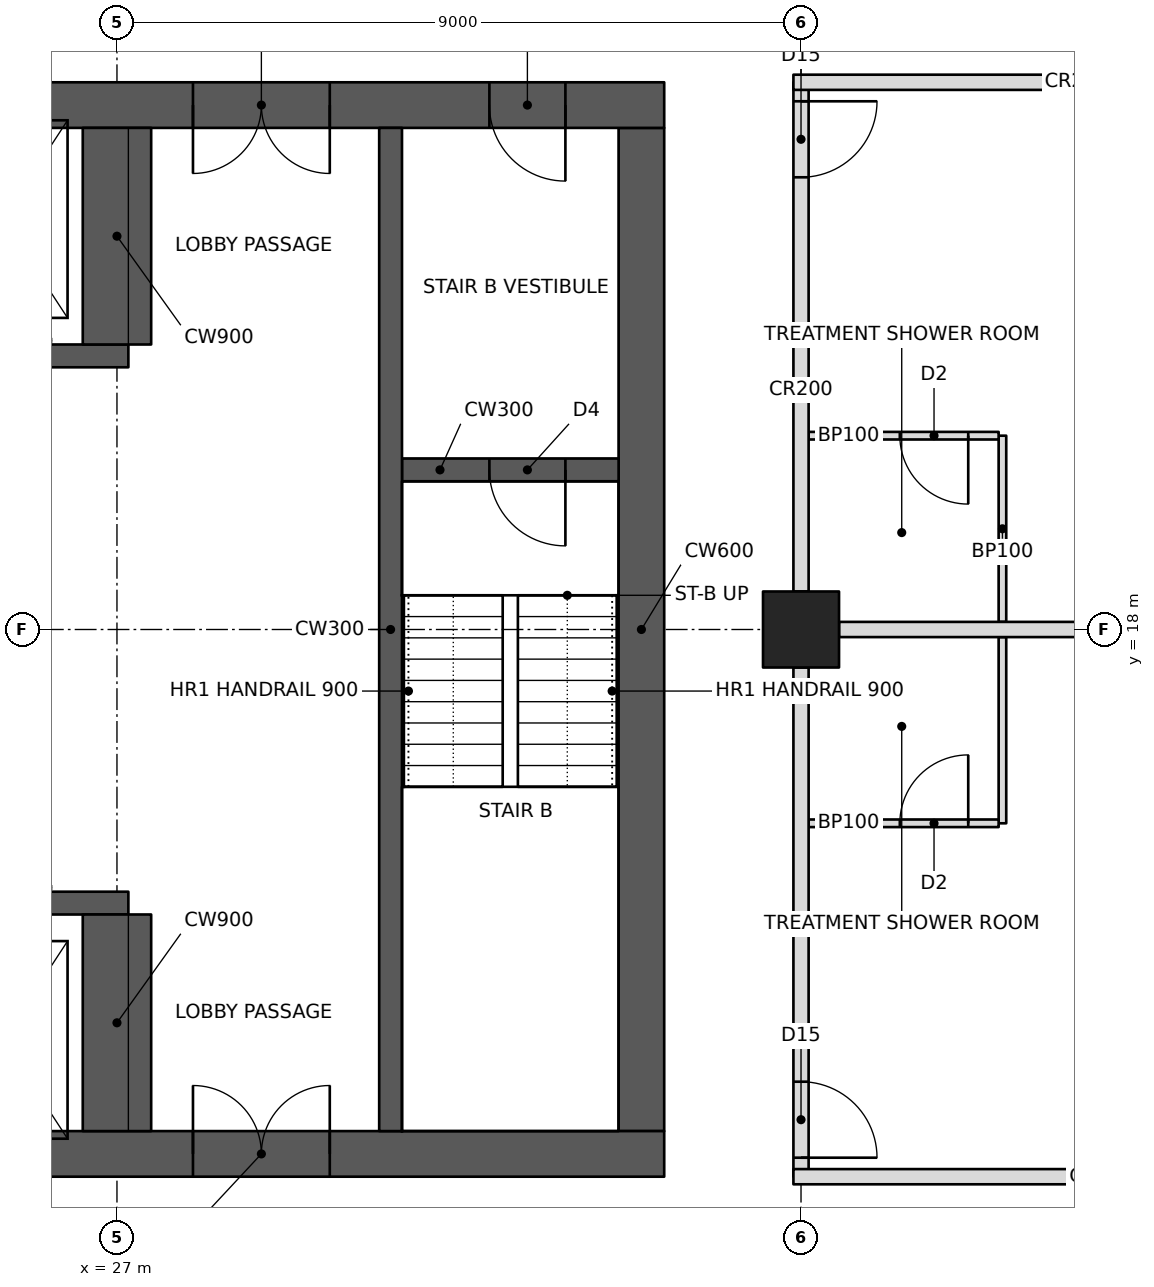
"""IFC4 building model, lengths in metres.
Left out: names, types, materials, properties, quantities, classifications, styles, units other than length and angle.
Written with IfcOpenShell. Run it as: python <this file> out.ifc"""

import sys

from ifc_helpers import new_model, si_unit, direction, frame, frame_2d, origin, origin_2d, place, context, subcontext, project, spatial, rectangle, hollow_rectangle, extrude, element, fill, save


model = new_model("IFC4")
c1 = context("Model", 3, precision=1e-05, world=origin(), true_north=direction((0.0, 1.0)))
c2 = subcontext(c1, "Body", "Model", "MODEL_VIEW")
j1 = project(units=[si_unit("LENGTHUNIT", "METRE"), si_unit("PLANEANGLEUNIT", "RADIAN")], contexts=[c1])
p1 = place(None, origin())
s1 = spatial("IfcSite", under=j1, at=p1, CompositionType="ELEMENT")
p2 = place(p1, origin())
s2 = spatial("IfcBuilding", under=s1, at=p2, CompositionType="ELEMENT")
p3 = place(p2, frame((0.0, 0.0, 160.4)))
s3 = spatial("IfcBuildingStorey", under=s2, at=p3, CompositionType="ELEMENT", Elevation=160.4)
p4 = place(p3, frame((36.0, 18.0, 0.0), z_axis=(0.0, 0.0, 1.0), x_axis=(0.0, 1.0, 0.0)))
e1 = element("IfcColumn", 1, at=p4, inside=s3, PredefinedType="COLUMN", context=c2, shape_type="SweptSolid", body=[
    extrude(hollow_rectangle(XDim=1.0, YDim=1.0, WallThickness=0.1, at=origin_2d()), origin(), (0.0, 0.0, 1.0), 3.4),
])
p5 = place(p3, frame((10.8, 11.1, 0.0), z_axis=(0.0, 0.0, 1.0), x_axis=(1.0, 0.0, 0.0)))
e2 = element("IfcWall", 2, at=p5, inside=s3, PredefinedType="SHEAR", context=c2, shape_type="SweptSolid", body=[
    extrude(rectangle(XDim=23.4, YDim=0.6, at=frame_2d((11.7, 0.0))), origin(), (0.0, 0.0, 1.0), 3.4),
])
p6 = place(p5, frame((1.0, 0.0, 0.0)))
e3 = element("IfcOpeningElement", 3, at=p6, cuts=e2, PredefinedType="OPENING", context=c2, shape_type="SweptSolid", body=[
    extrude(rectangle(XDim=1.0, YDim=2.1, at=frame_2d((0.5, 1.05))), frame((0.0, 0.31, 0.0), z_axis=(0.0, -1.0, 0.0), x_axis=(1.0, 0.0, 0.0)), (0.0, 0.0, 1.0), 0.62),
])
p7 = place(p5, frame((17.2, 0.0, 0.0)))
e4 = element("IfcOpeningElement", 4, at=p7, cuts=e2, PredefinedType="OPENING", context=c2, shape_type="SweptSolid", body=[
    extrude(rectangle(XDim=1.8, YDim=2.1, at=frame_2d((0.9, 1.05))), frame((0.0, 0.31, 0.0), z_axis=(0.0, -1.0, 0.0), x_axis=(1.0, 0.0, 0.0)), (0.0, 0.0, 1.0), 0.62),
])
p8 = place(p3, frame((10.8, 24.9, 0.0), z_axis=(0.0, 0.0, 1.0), x_axis=(1.0, 0.0, 0.0)))
e5 = element("IfcWall", 5, at=p8, inside=s3, PredefinedType="SHEAR", context=c2, shape_type="SweptSolid", body=[
    extrude(rectangle(XDim=23.4, YDim=0.6, at=frame_2d((11.7, 0.0))), origin(), (0.0, 0.0, 1.0), 3.4),
])
p9 = place(p8, frame((17.2, 0.0, 0.0)))
e6 = element("IfcOpeningElement", 6, at=p9, cuts=e5, PredefinedType="OPENING", context=c2, shape_type="SweptSolid", body=[
    extrude(rectangle(XDim=1.8, YDim=2.1, at=frame_2d((0.9, 1.05))), frame((0.0, 0.31, 0.0), z_axis=(0.0, -1.0, 0.0), x_axis=(1.0, 0.0, 0.0)), (0.0, 0.0, 1.0), 0.62),
])
p10 = place(p8, frame((21.1, 0.0, 0.0)))
e7 = element("IfcOpeningElement", 7, at=p10, cuts=e5, PredefinedType="OPENING", context=c2, shape_type="SweptSolid", body=[
    extrude(rectangle(XDim=1.0, YDim=2.1, at=frame_2d((0.5, 1.05))), frame((0.0, 0.31, 0.0), z_axis=(0.0, -1.0, 0.0), x_axis=(1.0, 0.0, 0.0)), (0.0, 0.0, 1.0), 0.62),
])
p11 = place(p8, frame((4.9, 0.0, 0.0)))
e8 = element("IfcOpeningElement", 8, at=p11, cuts=e5, PredefinedType="OPENING", context=c2, shape_type="SweptSolid", body=[
    extrude(rectangle(XDim=1.0, YDim=2.1, at=frame_2d((0.5, 1.05))), frame((0.0, 0.31, 0.0), z_axis=(0.0, -1.0, 0.0), x_axis=(1.0, 0.0, 0.0)), (0.0, 0.0, 1.0), 0.62),
])
p12 = place(p3, frame((33.9, 11.4, 0.0), z_axis=(0.0, 0.0, 1.0), x_axis=(0.0, 1.0, 0.0)))
e9 = element("IfcWall", 9, at=p12, inside=s3, PredefinedType="SHEAR", context=c2, shape_type="SweptSolid", body=[
    extrude(rectangle(XDim=13.2, YDim=0.6, at=frame_2d((6.6, 0.0))), origin(), (0.0, 0.0, 1.0), 3.4),
])
p13 = place(p3, frame((18.15, 14.4, 0.0), z_axis=(0.0, 0.0, 1.0), x_axis=(1.0, 0.0, 0.0)))
e10 = element("IfcWall", 10, at=p13, inside=s3, PredefinedType="SHEAR", context=c2, shape_type="SweptSolid", body=[
    extrude(rectangle(XDim=9.0, YDim=0.3, at=frame_2d((4.5, 0.0))), origin(), (0.0, 0.0, 1.0), 3.4),
])
p14 = place(p13, frame((0.8, 0.0, 0.0)))
e11 = element("IfcOpeningElement", 11, at=p14, cuts=e10, PredefinedType="OPENING", context=c2, shape_type="SweptSolid", body=[
    extrude(rectangle(XDim=1.1, YDim=2.1, at=frame_2d((0.55, 1.05))), frame((0.0, 0.16, 0.0), z_axis=(0.0, -1.0, 0.0), x_axis=(1.0, 0.0, 0.0)), (0.0, 0.0, 1.0), 0.32),
])
p15 = place(p13, frame((6.75, 0.0, 0.0)))
e12 = element("IfcOpeningElement", 12, at=p15, cuts=e10, PredefinedType="OPENING", context=c2, shape_type="SweptSolid", body=[
    extrude(rectangle(XDim=1.2, YDim=2.1, at=frame_2d((0.6, 1.05))), frame((0.0, 0.16, 0.0), z_axis=(0.0, -1.0, 0.0), x_axis=(1.0, 0.0, 0.0)), (0.0, 0.0, 1.0), 0.32),
])
p16 = place(p13, frame((3.8, 0.0, 0.0)))
e13 = element("IfcOpeningElement", 13, at=p16, cuts=e10, PredefinedType="OPENING", context=c2, shape_type="SweptSolid", body=[
    extrude(rectangle(XDim=1.1, YDim=2.1, at=frame_2d((0.55, 1.05))), frame((0.0, 0.16, 0.0), z_axis=(0.0, -1.0, 0.0), x_axis=(1.0, 0.0, 0.0)), (0.0, 0.0, 1.0), 0.32),
])
p17 = place(p3, frame((27.0, 11.4, 0.0), z_axis=(0.0, 0.0, 1.0), x_axis=(0.0, 1.0, 0.0)))
e14 = element("IfcWall", 14, at=p17, inside=s3, PredefinedType="SHEAR", context=c2, shape_type="SweptSolid", body=[
    extrude(rectangle(XDim=2.85, YDim=0.9, at=frame_2d((1.425, 0.0))), origin(), (0.0, 0.0, 1.0), 3.4),
])
p18 = place(p3, frame((18.15, 21.6, 0.0), z_axis=(0.0, 0.0, 1.0), x_axis=(1.0, 0.0, 0.0)))
e15 = element("IfcWall", 15, at=p18, inside=s3, PredefinedType="SHEAR", context=c2, shape_type="SweptSolid", body=[
    extrude(rectangle(XDim=9.0, YDim=0.3, at=frame_2d((4.5, 0.0))), origin(), (0.0, 0.0, 1.0), 3.4),
])
p19 = place(p18, frame((0.8, 0.0, 0.0)))
e16 = element("IfcOpeningElement", 16, at=p19, cuts=e15, PredefinedType="OPENING", context=c2, shape_type="SweptSolid", body=[
    extrude(rectangle(XDim=1.1, YDim=2.1, at=frame_2d((0.55, 1.05))), frame((0.0, 0.16, 0.0), z_axis=(0.0, -1.0, 0.0), x_axis=(1.0, 0.0, 0.0)), (0.0, 0.0, 1.0), 0.32),
])
p20 = place(p18, frame((3.8, 0.0, 0.0)))
e17 = element("IfcOpeningElement", 17, at=p20, cuts=e15, PredefinedType="OPENING", context=c2, shape_type="SweptSolid", body=[
    extrude(rectangle(XDim=1.1, YDim=2.1, at=frame_2d((0.55, 1.05))), frame((0.0, 0.16, 0.0), z_axis=(0.0, -1.0, 0.0), x_axis=(1.0, 0.0, 0.0)), (0.0, 0.0, 1.0), 0.32),
])
p21 = place(p18, frame((6.75, 0.0, 0.0)))
e18 = element("IfcOpeningElement", 18, at=p21, cuts=e15, PredefinedType="OPENING", context=c2, shape_type="SweptSolid", body=[
    extrude(rectangle(XDim=1.2, YDim=2.1, at=frame_2d((0.6, 1.05))), frame((0.0, 0.16, 0.0), z_axis=(0.0, -1.0, 0.0), x_axis=(1.0, 0.0, 0.0)), (0.0, 0.0, 1.0), 0.32),
])
p22 = place(p3, frame((27.0, 21.75, 0.0), z_axis=(0.0, 0.0, 1.0), x_axis=(0.0, 1.0, 0.0)))
e19 = element("IfcWall", 19, at=p22, inside=s3, PredefinedType="SHEAR", context=c2, shape_type="SweptSolid", body=[
    extrude(rectangle(XDim=2.85, YDim=0.9, at=frame_2d((1.425, 0.0))), origin(), (0.0, 0.0, 1.0), 3.4),
])
p23 = place(p3, frame((30.6, 11.4, 0.0), z_axis=(0.0, 0.0, 1.0), x_axis=(0.0, 1.0, 0.0)))
e20 = element("IfcWall", 20, at=p23, inside=s3, PredefinedType="SHEAR", context=c2, shape_type="SweptSolid", body=[
    extrude(rectangle(XDim=13.2, YDim=0.3, at=frame_2d((6.6, 0.0))), origin(), (0.0, 0.0, 1.0), 3.4),
])
p24 = place(p3, frame((30.75, 20.1, 0.0), z_axis=(0.0, 0.0, 1.0), x_axis=(1.0, 0.0, 0.0)))
e21 = element("IfcWall", 21, at=p24, inside=s3, PredefinedType="SHEAR", context=c2, shape_type="SweptSolid", body=[
    extrude(rectangle(XDim=2.85, YDim=0.3, at=frame_2d((1.425, 0.0))), origin(), (0.0, 0.0, 1.0), 3.4),
])
p25 = place(p24, frame((1.15, 0.0, 0.0)))
e22 = element("IfcOpeningElement", 22, at=p25, cuts=e21, PredefinedType="OPENING", context=c2, shape_type="SweptSolid", body=[
    extrude(rectangle(XDim=1.0, YDim=2.1, at=frame_2d((0.5, 1.05))), frame((0.0, 0.16, 0.0), z_axis=(0.0, -1.0, 0.0), x_axis=(1.0, 0.0, 0.0)), (0.0, 0.0, 1.0), 0.32),
])
p26 = place(p3, frame((36.0, 10.8, 0.0), z_axis=(0.0, 0.0, 1.0), x_axis=(0.0, 1.0, 0.0)))
e23 = element("IfcWall", 23, at=p26, inside=s3, PredefinedType="PARTITIONING", context=c2, shape_type="SweptSolid", body=[
    extrude(rectangle(XDim=6.7, YDim=0.2, at=frame_2d((3.35, 0.0))), origin(), (0.0, 0.0, 1.0), 2.405),
])
p27 = place(p26, frame((0.25, 0.0, 0.0)))
e24 = element("IfcOpeningElement", 24, at=p27, cuts=e23, PredefinedType="OPENING", context=c2, shape_type="SweptSolid", body=[
    extrude(rectangle(XDim=1.0, YDim=2.1, at=frame_2d((0.5, 1.05))), frame((0.0, 0.11, 0.0), z_axis=(0.0, -1.0, 0.0), x_axis=(1.0, 0.0, 0.0)), (0.0, 0.0, 1.0), 0.22),
])
p28 = place(p3, frame((36.0, 18.5, 0.0), z_axis=(0.0, 0.0, 1.0), x_axis=(0.0, 1.0, 0.0)))
e25 = element("IfcWall", 25, at=p28, inside=s3, PredefinedType="PARTITIONING", context=c2, shape_type="SweptSolid", body=[
    extrude(rectangle(XDim=6.7, YDim=0.2, at=frame_2d((3.35, 0.0))), origin(), (0.0, 0.0, 1.0), 2.405),
])
p29 = place(p28, frame((5.45, 0.0, 0.0)))
e26 = element("IfcOpeningElement", 26, at=p29, cuts=e25, PredefinedType="OPENING", context=c2, shape_type="SweptSolid", body=[
    extrude(rectangle(XDim=1.0, YDim=2.1, at=frame_2d((0.5, 1.05))), frame((0.0, 0.11, 0.0), z_axis=(0.0, -1.0, 0.0), x_axis=(1.0, 0.0, 0.0)), (0.0, 0.0, 1.0), 0.22),
])
p30 = place(p3, frame((35.9, 10.8, 0.0), z_axis=(0.0, 0.0, 1.0), x_axis=(1.0, 0.0, 0.0)))
e27 = element("IfcWall", 27, at=p30, inside=s3, PredefinedType="PARTITIONING", context=c2, shape_type="SweptSolid", body=[
    extrude(rectangle(XDim=8.1, YDim=0.2, at=frame_2d((4.05, 0.0))), origin(), (0.0, 0.0, 1.0), 2.404),
])
p31 = place(p3, frame((35.9, 25.2, 0.0), z_axis=(0.0, 0.0, 1.0), x_axis=(1.0, 0.0, 0.0)))
e28 = element("IfcWall", 28, at=p31, inside=s3, PredefinedType="PARTITIONING", context=c2, shape_type="SweptSolid", body=[
    extrude(rectangle(XDim=7.45, YDim=0.2, at=frame_2d((3.725, 0.0))), origin(), (0.0, 0.0, 1.0), 2.404),
])
p32 = place(p3, frame((36.5, 18.0, 0.0), z_axis=(0.0, 0.0, 1.0), x_axis=(1.0, 0.0, 0.0)))
e29 = element("IfcWall", 29, at=p32, inside=s3, PredefinedType="PARTITIONING", context=c2, shape_type="SweptSolid", body=[
    extrude(rectangle(XDim=7.5, YDim=0.2, at=frame_2d((3.75, 0.0))), origin(), (0.0, 0.0, 1.0), 2.405),
])
p33 = place(p3, frame((38.65, 15.45, 0.0), z_axis=(0.0, 0.0, 1.0), x_axis=(0.0, 1.0, 0.0)))
e30 = element("IfcWall", 30, at=p33, inside=s3, PredefinedType="PARTITIONING", context=c2, shape_type="SweptSolid", body=[
    extrude(rectangle(XDim=2.45, YDim=0.1, at=frame_2d((1.225, 0.0))), origin(), (0.0, 0.0, 1.0), 2.404),
])
p34 = place(p3, frame((36.1, 15.45, 0.0), z_axis=(0.0, 0.0, 1.0), x_axis=(1.0, 0.0, 0.0)))
e31 = element("IfcWall", 31, at=p34, inside=s3, PredefinedType="PARTITIONING", context=c2, shape_type="SweptSolid", body=[
    extrude(rectangle(XDim=2.5, YDim=0.1, at=frame_2d((1.25, 0.0))), origin(), (0.0, 0.0, 1.0), 2.404),
])
p35 = place(p34, frame((1.2, 0.0, 0.0)))
e32 = element("IfcOpeningElement", 32, at=p35, cuts=e31, PredefinedType="OPENING", context=c2, shape_type="SweptSolid", body=[
    extrude(rectangle(XDim=0.9, YDim=2.1, at=frame_2d((0.45, 1.05))), frame((0.0, 0.06, 0.0), z_axis=(0.0, -1.0, 0.0), x_axis=(1.0, 0.0, 0.0)), (0.0, 0.0, 1.0), 0.12),
])
p36 = place(p3, frame((38.65, 18.1, 0.0), z_axis=(0.0, 0.0, 1.0), x_axis=(0.0, 1.0, 0.0)))
e33 = element("IfcWall", 33, at=p36, inside=s3, PredefinedType="PARTITIONING", context=c2, shape_type="SweptSolid", body=[
    extrude(rectangle(XDim=2.45, YDim=0.1, at=frame_2d((1.225, 0.0))), origin(), (0.0, 0.0, 1.0), 2.404),
])
p37 = place(p3, frame((36.1, 20.55, 0.0), z_axis=(0.0, 0.0, 1.0), x_axis=(1.0, 0.0, 0.0)))
e34 = element("IfcWall", 34, at=p37, inside=s3, PredefinedType="PARTITIONING", context=c2, shape_type="SweptSolid", body=[
    extrude(rectangle(XDim=2.5, YDim=0.1, at=frame_2d((1.25, 0.0))), origin(), (0.0, 0.0, 1.0), 2.404),
])
p38 = place(p37, frame((1.2, 0.0, 0.0)))
e35 = element("IfcOpeningElement", 35, at=p38, cuts=e34, PredefinedType="OPENING", context=c2, shape_type="SweptSolid", body=[
    extrude(rectangle(XDim=0.9, YDim=2.1, at=frame_2d((0.45, 1.05))), frame((0.0, 0.06, 0.0), z_axis=(0.0, -1.0, 0.0), x_axis=(1.0, 0.0, 0.0)), (0.0, 0.0, 1.0), 0.12),
])
p39 = place(p35, origin())
e36 = element("IfcDoor", 36, at=p39, inside=s3, OperationType="SINGLE_SWING_RIGHT", PredefinedType="DOOR", context=c2, shape_type="SweptSolid", body=[
    extrude(rectangle(XDim=0.9, YDim=2.1, at=frame_2d((0.45, 1.05))), frame((0.0, 0.025, 0.0), z_axis=(0.0, -1.0, 0.0), x_axis=(1.0, 0.0, 0.0)), (0.0, 0.0, 1.0), 0.05),
])
fill(e32, e36)
p40 = place(p27, frame((1.0, 0.0, 0.0), z_axis=(0.0, 0.0, 1.0), x_axis=(-1.0, 0.0, 0.0)))
e37 = element("IfcDoor", 37, at=p40, inside=s3, OperationType="SINGLE_SWING_RIGHT", PredefinedType="DOOR", context=c2, shape_type="SweptSolid", body=[
    extrude(rectangle(XDim=1.0, YDim=2.1, at=frame_2d((0.5, 1.05))), frame((0.0, 0.025, 0.0), z_axis=(0.0, -1.0, 0.0), x_axis=(1.0, 0.0, 0.0)), (0.0, 0.0, 1.0), 0.05),
])
fill(e24, e37)
p41 = place(p38, frame((0.9, 0.0, 0.0), z_axis=(0.0, 0.0, 1.0), x_axis=(-1.0, 0.0, 0.0)))
e38 = element("IfcDoor", 38, at=p41, inside=s3, OperationType="SINGLE_SWING_LEFT", PredefinedType="DOOR", context=c2, shape_type="SweptSolid", body=[
    extrude(rectangle(XDim=0.9, YDim=2.1, at=frame_2d((0.45, 1.05))), frame((0.0, 0.025, 0.0), z_axis=(0.0, -1.0, 0.0), x_axis=(1.0, 0.0, 0.0)), (0.0, 0.0, 1.0), 0.05),
])
fill(e35, e38)
p42 = place(p29, frame((1.0, 0.0, 0.0), z_axis=(0.0, 0.0, 1.0), x_axis=(-1.0, 0.0, 0.0)))
e39 = element("IfcDoor", 39, at=p42, inside=s3, OperationType="SINGLE_SWING_LEFT", PredefinedType="DOOR", context=c2, shape_type="SweptSolid", body=[
    extrude(rectangle(XDim=1.0, YDim=2.1, at=frame_2d((0.5, 1.05))), frame((0.0, 0.025, 0.0), z_axis=(0.0, -1.0, 0.0), x_axis=(1.0, 0.0, 0.0)), (0.0, 0.0, 1.0), 0.05),
])
fill(e26, e39)
p43 = place(p7, origin())
e40 = element("IfcDoor", 40, at=p43, inside=s3, OperationType="DOUBLE_DOOR_SINGLE_SWING", PredefinedType="DOOR", context=c2, shape_type="SweptSolid", body=[
    extrude(rectangle(XDim=1.8, YDim=2.1, at=frame_2d((0.9, 1.05))), frame((0.0, 0.025, 0.0), z_axis=(0.0, -1.0, 0.0), x_axis=(1.0, 0.0, 0.0)), (0.0, 0.0, 1.0), 0.05),
])
fill(e4, e40)
p44 = place(p9, frame((1.8, 0.0, 0.0), z_axis=(0.0, 0.0, 1.0), x_axis=(-1.0, 0.0, 0.0)))
e41 = element("IfcDoor", 41, at=p44, inside=s3, OperationType="DOUBLE_DOOR_SINGLE_SWING", PredefinedType="DOOR", context=c2, shape_type="SweptSolid", body=[
    extrude(rectangle(XDim=1.8, YDim=2.1, at=frame_2d((0.9, 1.05))), frame((0.0, 0.025, 0.0), z_axis=(0.0, -1.0, 0.0), x_axis=(1.0, 0.0, 0.0)), (0.0, 0.0, 1.0), 0.05),
])
fill(e6, e41)
p45 = place(p10, frame((1.0, 0.0, 0.0), z_axis=(0.0, 0.0, 1.0), x_axis=(-1.0, 0.0, 0.0)))
e42 = element("IfcDoor", 42, at=p45, inside=s3, OperationType="SINGLE_SWING_LEFT", PredefinedType="DOOR", context=c2, shape_type="SweptSolid", body=[
    extrude(rectangle(XDim=1.0, YDim=2.1, at=frame_2d((0.5, 1.05))), frame((0.0, 0.025, 0.0), z_axis=(0.0, -1.0, 0.0), x_axis=(1.0, 0.0, 0.0)), (0.0, 0.0, 1.0), 0.05),
])
fill(e7, e42)
p46 = place(p25, frame((1.0, 0.0, 0.0), z_axis=(0.0, 0.0, 1.0), x_axis=(-1.0, 0.0, 0.0)))
e43 = element("IfcDoor", 43, at=p46, inside=s3, OperationType="SINGLE_SWING_LEFT", PredefinedType="DOOR", context=c2, shape_type="SweptSolid", body=[
    extrude(rectangle(XDim=1.0, YDim=2.1, at=frame_2d((0.5, 1.05))), frame((0.0, 0.025, 0.0), z_axis=(0.0, -1.0, 0.0), x_axis=(1.0, 0.0, 0.0)), (0.0, 0.0, 1.0), 0.05),
])
fill(e22, e43)
save(model, sys.argv[1])
